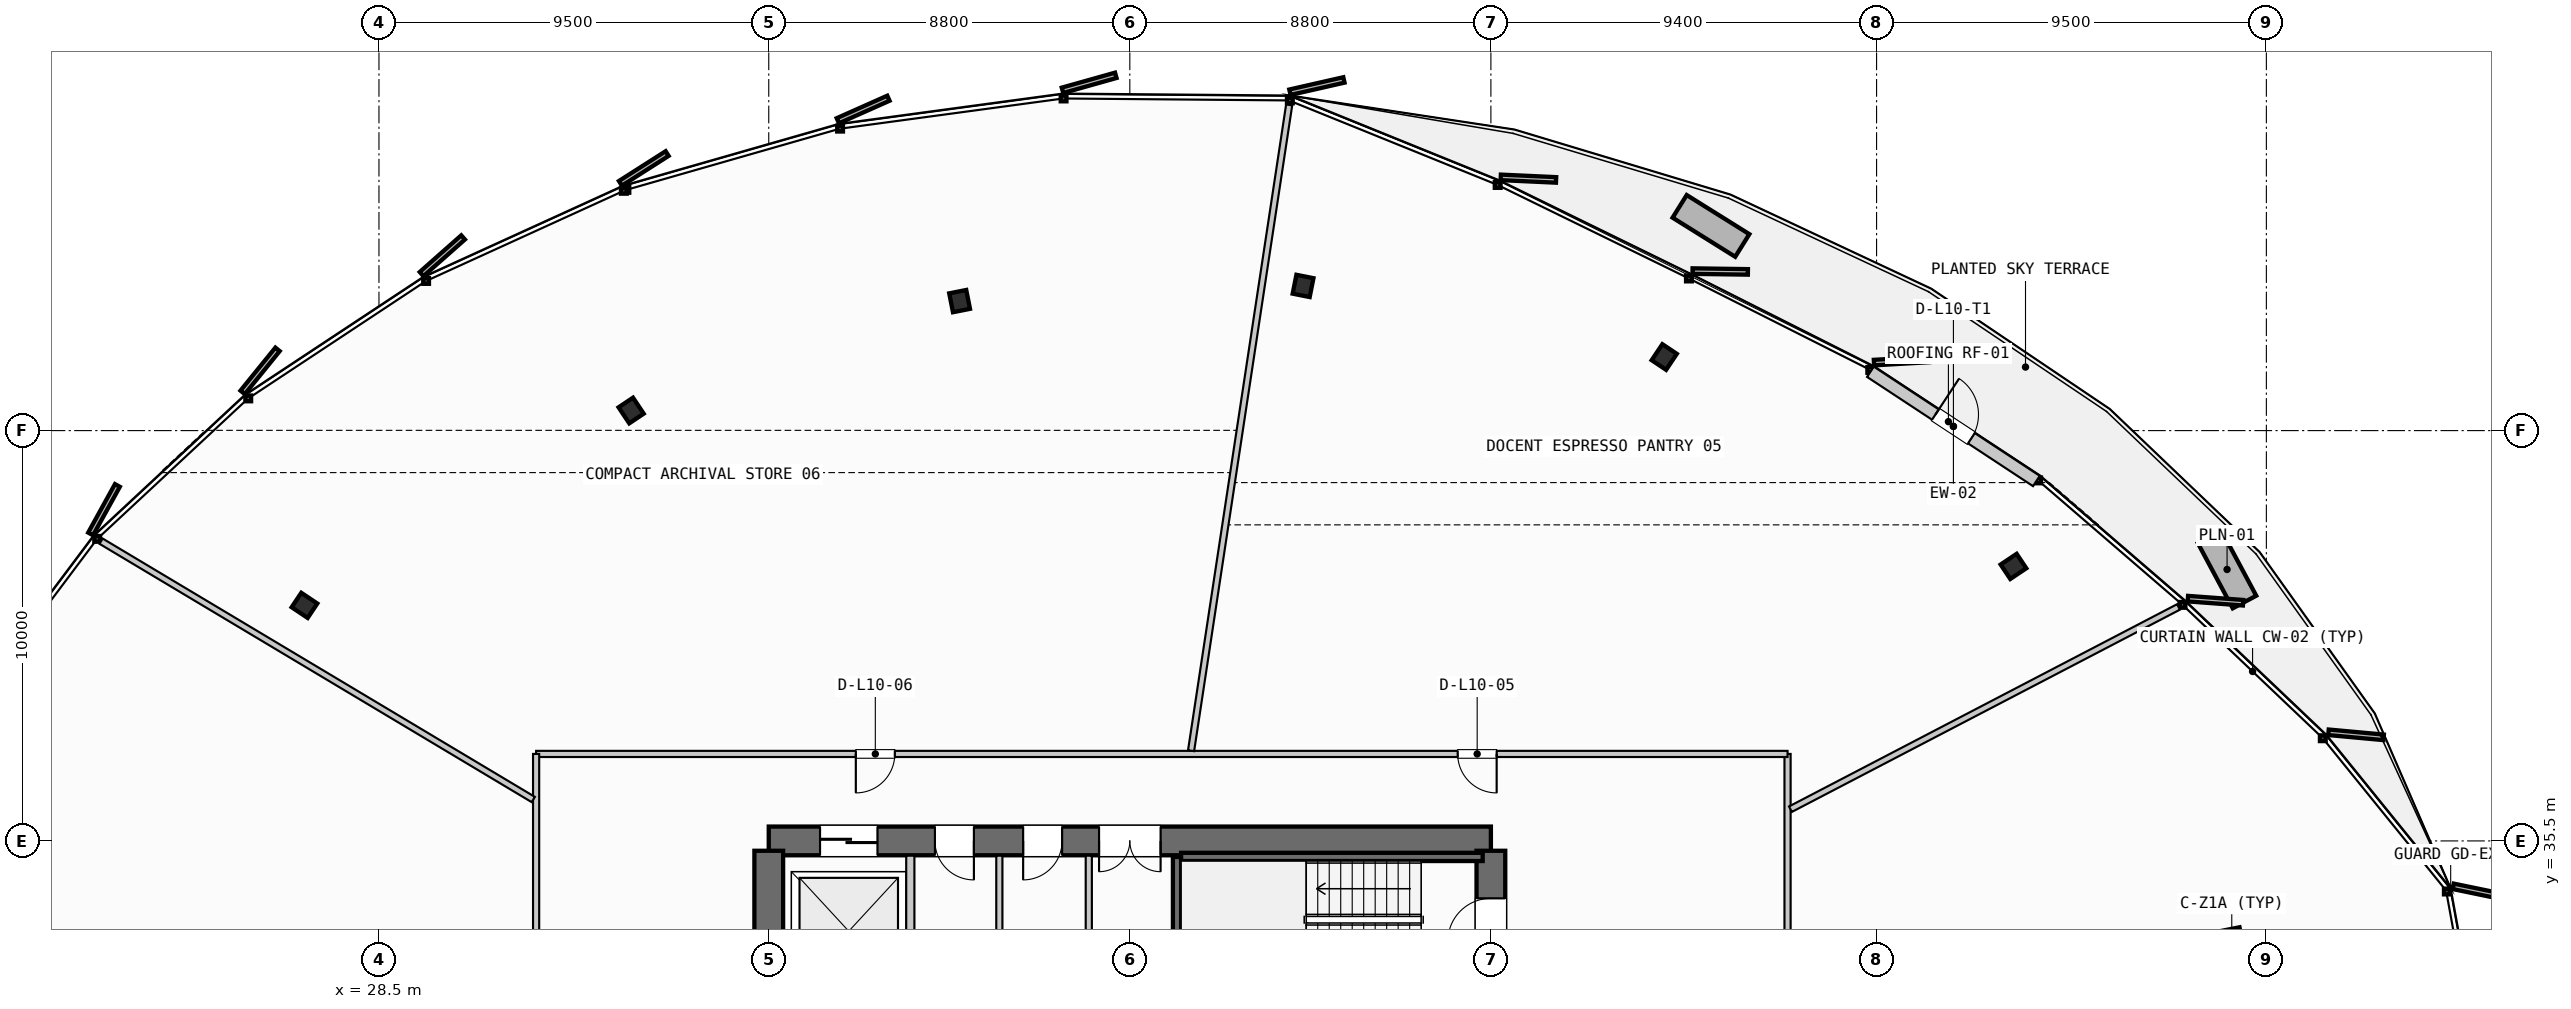
"""IFC4 building model, lengths in metres.
Left out: names, types, materials, properties, quantities, classifications, styles, units other than length and angle.
Written with IfcOpenShell. Run it as: python <this file> out.ifc"""

import sys

from ifc_helpers import new_model, si_unit, direction, frame, frame_2d, origin, origin_2d, place, context, subcontext, project, spatial, rectangle, i_section, extrude, source, transform, mapped, element, fill, save


model = new_model("IFC4")
c1 = context("Model", 3, precision=1e-05, world=origin(), true_north=direction((0.0, 1.0)))
c2 = subcontext(c1, "Body", "Model", "MODEL_VIEW")
j1 = project(units=[si_unit("LENGTHUNIT", "METRE"), si_unit("PLANEANGLEUNIT", "RADIAN")], contexts=[c1])
p1 = place(None, origin())
s1 = spatial("IfcSite", under=j1, at=p1, CompositionType="ELEMENT")
p2 = place(p1, origin())
s2 = spatial("IfcBuilding", under=s1, at=p2, CompositionType="ELEMENT")
p3 = place(p2, frame((0.0, 0.0, 44.8)))
s3 = spatial("IfcBuildingStorey", under=s2, at=p3, CompositionType="ELEMENT", Elevation=44.8)
p4 = place(p3, frame((55.6, 35.5, 0.0), z_axis=(0.0, 0.0, 1.0), x_axis=(-1.0, 0.0, 0.0)))
e1 = element("IfcWall", 1, at=p4, inside=s3, PredefinedType="SHEAR", context=c2, shape_type="SweptSolid", body=[
    extrude(rectangle(XDim=17.6, YDim=0.7, at=frame_2d((8.8, 0.0))), origin(), (0.0, 0.0, 1.0), 3.55),
])
p5 = place(p4, frame((8.05, 0.0, 0.0)))
e2 = element("IfcOpeningElement", 2, at=p5, cuts=e1, PredefinedType="OPENING", context=c2, shape_type="SweptSolid", body=[
    extrude(rectangle(XDim=1.5, YDim=2.2, at=frame_2d((0.75, 1.1))), frame((0.0, 0.36, 0.0), z_axis=(0.0, -1.0, 0.0), x_axis=(1.0, 0.0, 0.0)), (0.0, 0.0, 1.0), 0.72),
])
p6 = place(p4, frame((14.95, 0.0, 0.0)))
e3 = element("IfcOpeningElement", 3, at=p6, cuts=e1, PredefinedType="OPENING", context=c2, shape_type="SweptSolid", body=[
    extrude(rectangle(XDim=1.4, YDim=2.3, at=frame_2d((0.7, 1.15))), frame((0.0, 0.36, 0.0), z_axis=(0.0, -1.0, 0.0), x_axis=(1.0, 0.0, 0.0)), (0.0, 0.0, 1.0), 0.72),
])
p7 = place(p4, frame((12.6, 0.0, 0.0)))
e4 = element("IfcOpeningElement", 4, at=p7, cuts=e1, PredefinedType="OPENING", context=c2, shape_type="SweptSolid", body=[
    extrude(rectangle(XDim=0.95, YDim=2.15, at=frame_2d((0.475, 1.075))), frame((0.0, 0.36, 0.0), z_axis=(0.0, -1.0, 0.0), x_axis=(1.0, 0.0, 0.0)), (0.0, 0.0, 1.0), 0.72),
])
p8 = place(p4, frame((10.45, 0.0, 0.0)))
e5 = element("IfcOpeningElement", 5, at=p8, cuts=e1, PredefinedType="OPENING", context=c2, shape_type="SweptSolid", body=[
    extrude(rectangle(XDim=0.95, YDim=2.15, at=frame_2d((0.475, 1.075))), frame((0.0, 0.36, 0.0), z_axis=(0.0, -1.0, 0.0), x_axis=(1.0, 0.0, 0.0)), (0.0, 0.0, 1.0), 0.72),
])
p9 = place(p3, frame((38.0, 35.26, 0.0), z_axis=(0.0, 0.0, 1.0), x_axis=(0.0, -1.0, 0.0)))
e6 = element("IfcWall", 6, at=p9, inside=s3, PredefinedType="SHEAR", context=c2, shape_type="SweptSolid", body=[
    extrude(rectangle(XDim=14.92, YDim=0.7, at=frame_2d((7.46, 0.0))), origin(), (0.0, 0.0, 1.0), 3.55),
])
p10 = place(p9, frame((5.21, 0.0, 0.0)))
e7 = element("IfcOpeningElement", 7, at=p10, cuts=e6, PredefinedType="OPENING", context=c2, shape_type="SweptSolid", body=[
    extrude(rectangle(XDim=1.1, YDim=2.2, at=frame_2d((0.55, 1.1))), frame((0.0, 0.36, 0.0), z_axis=(0.0, -1.0, 0.0), x_axis=(1.0, 0.0, 0.0)), (0.0, 0.0, 1.0), 0.72),
])
p11 = place(p3, frame((55.6, 20.34, 0.0), z_axis=(0.0, 0.0, 1.0), x_axis=(0.0, 1.0, 0.0)))
e8 = element("IfcWall", 8, at=p11, inside=s3, PredefinedType="SHEAR", context=c2, shape_type="SweptSolid", body=[
    extrude(rectangle(XDim=14.92, YDim=0.7, at=frame_2d((7.46, 0.0))), origin(), (0.0, 0.0, 1.0), 3.55),
])
p12 = place(p11, frame((12.71, 0.0, 0.0)))
e9 = element("IfcOpeningElement", 9, at=p12, cuts=e8, PredefinedType="OPENING", context=c2, shape_type="SweptSolid", body=[
    extrude(rectangle(XDim=1.05, YDim=2.15, at=frame_2d((0.525, 1.075))), frame((0.0, 0.36, 0.0), z_axis=(0.0, -1.0, 0.0), x_axis=(1.0, 0.0, 0.0)), (0.0, 0.0, 1.0), 0.72),
])
p13 = place(p11, frame((8.61, 0.0, 0.0)))
e10 = element("IfcOpeningElement", 10, at=p13, cuts=e8, PredefinedType="OPENING", context=c2, shape_type="SweptSolid", body=[
    extrude(rectangle(XDim=1.1, YDim=2.2, at=frame_2d((0.55, 1.1))), frame((0.0, 0.36, 0.0), z_axis=(0.0, -1.0, 0.0), x_axis=(1.0, 0.0, 0.0)), (0.0, 0.0, 1.0), 0.72),
])
m1 = source(origin(), c2, "Body", "SweptSolid", [
    extrude(i_section(OverallWidth=0.423, OverallDepth=0.469, WebThickness=0.051, FlangeThickness=0.081, FilletRadius=0.015, at=origin_2d()), origin(), (0.0, 0.0, 1.0), 3.55),
])
for number, where, z_axis, x_axis in (
    (11, (73.657, 33.142, 0.0), (0.0, 0.0, 1.0), (0.981, 0.195, 0.0)),
    (12, (68.336, 42.19, 0.0), (0.0, 0.0, 1.0), (0.831, 0.556, 0.0)),
    (13, (59.825, 47.293, 0.0), (0.0, 0.0, 1.0), (0.556, 0.831, 0.0)),
    (14, (51.022, 49.026, 0.0), (0.0, 0.0, 1.0), (0.195, 0.981, 0.0)),
    (15, (42.652, 48.656, 0.0), (0.0, 0.0, 1.0), (-0.195, 0.981, 0.0)),
    (16, (34.646, 45.99, 0.0), (0.0, 0.0, 1.0), (-0.556, 0.831, 0.0)),
    (17, (26.685, 41.241, 0.0), (0.0, 0.0, 1.0), (-0.831, 0.556, 0.0)),
):
    element("IfcColumn", number, at=place(p3, frame(where, z_axis=z_axis, x_axis=x_axis)), inside=s3, PredefinedType="COLUMN", context=c2, shape_type="MappedRepresentation", body=[
        mapped(m1, transform((0.0, 0.0, 0.0), scale=1.0)),
    ])
p14 = place(p3, frame((64.85, 46.933, 0.0), z_axis=(0.0, 0.0, 1.0), x_axis=(0.835309232046, -0.549780398758, 0.0)))
e18 = element("IfcWall", 18, at=p14, inside=s3, PredefinedType="SOLIDWALL", context=c2, shape_type="SweptSolid", body=[
    extrude(rectangle(XDim=4.842, YDim=0.3, at=frame_2d((2.421, 0.0))), origin(), (0.0, 0.0, 1.0), 2.925),
])
p15 = place(p14, frame((1.896, 0.0, 0.0)))
e19 = element("IfcOpeningElement", 19, at=p15, cuts=e18, PredefinedType="OPENING", context=c2, shape_type="SweptSolid", body=[
    extrude(rectangle(XDim=1.05, YDim=2.2, at=frame_2d((0.525, 1.1))), frame((0.0, 0.16, 0.0), z_axis=(0.0, -1.0, 0.0), x_axis=(1.0, 0.0, 0.0)), (0.0, 0.0, 1.0), 0.32),
])
p16 = place(p3, frame((47.95, 32.05, 0.0), z_axis=(0.0, 0.0, 1.0), x_axis=(0.0, 1.0, 0.0)))
e20 = element("IfcWall", 20, at=p16, inside=s3, PredefinedType="SHEAR", context=c2, shape_type="SweptSolid", body=[
    extrude(rectangle(XDim=3.06, YDim=0.2, at=frame_2d((1.53, 0.0))), origin(), (0.0, 0.0, 1.0), 3.55),
])
p17 = place(p3, frame((48.05, 35.11, 0.0), z_axis=(0.0, 0.0, 1.0), x_axis=(1.0, 0.0, 0.0)))
e21 = element("IfcWall", 21, at=p17, inside=s3, PredefinedType="SHEAR", context=c2, shape_type="SweptSolid", body=[
    extrude(rectangle(XDim=7.35, YDim=0.2, at=frame_2d((3.675, 0.0))), origin(), (0.0, 0.0, 1.0), 3.55),
])
p18 = place(p3, frame((41.45, 31.85, 0.0), z_axis=(0.0, 0.0, 1.0), x_axis=(0.0, 1.0, 0.0)))
e22 = element("IfcWall", 22, at=p18, inside=s3, PredefinedType="PARTITIONING", context=c2, shape_type="SweptSolid", body=[
    extrude(rectangle(XDim=3.29, YDim=0.2, at=frame_2d((1.645, 0.0))), origin(), (0.0, 0.0, 1.0), 2.785),
])
p19 = place(p3, frame((45.8, 31.85, 0.0), z_axis=(0.0, 0.0, 1.0), x_axis=(0.0, 1.0, 0.0)))
e23 = element("IfcWall", 23, at=p19, inside=s3, PredefinedType="PARTITIONING", context=c2, shape_type="SweptSolid", body=[
    extrude(rectangle(XDim=3.29, YDim=0.15, at=frame_2d((1.645, 0.0))), origin(), (0.0, 0.0, 1.0), 2.785),
])
p20 = place(p3, frame((43.62, 31.85, 0.0), z_axis=(0.0, 0.0, 1.0), x_axis=(0.0, 1.0, 0.0)))
e24 = element("IfcWall", 24, at=p20, inside=s3, PredefinedType="PLUMBINGWALL", context=c2, shape_type="SweptSolid", body=[
    extrude(rectangle(XDim=3.29, YDim=0.15, at=frame_2d((1.645, 0.0))), origin(), (0.0, 0.0, 1.0), 2.785),
])
p21 = place(p3, frame((62.83, 17.14, 0.0), z_axis=(0.0, 0.0, 1.0), x_axis=(0.0, 1.0, 0.0)))
e25 = element("IfcWall", 25, at=p21, inside=s3, PredefinedType="PARTITIONING", context=c2, shape_type="SweptSolid", body=[
    extrude(rectangle(XDim=20.48, YDim=0.15, at=frame_2d((10.24, 0.0))), origin(), (0.0, 0.0, 1.0), 2.785),
])
p22 = place(p21, frame((2.438, 0.0, 0.0)))
e26 = element("IfcOpeningElement", 26, at=p22, cuts=e25, PredefinedType="OPENING", context=c2, shape_type="SweptSolid", body=[
    extrude(rectangle(XDim=0.95, YDim=2.15, at=frame_2d((0.475, 1.075))), frame((0.0, 0.085, 0.0), z_axis=(0.0, -1.0, 0.0), x_axis=(1.0, 0.0, 0.0)), (0.0, 0.0, 1.0), 0.17),
])
p23 = place(p21, frame((11.341, 0.0, 0.0)))
e27 = element("IfcOpeningElement", 27, at=p23, cuts=e25, PredefinedType="OPENING", context=c2, shape_type="SweptSolid", body=[
    extrude(rectangle(XDim=0.95, YDim=2.15, at=frame_2d((0.475, 1.075))), frame((0.0, 0.085, 0.0), z_axis=(0.0, -1.0, 0.0), x_axis=(1.0, 0.0, 0.0)), (0.0, 0.0, 1.0), 0.17),
])
p24 = place(p3, frame((62.83, 37.62, 0.0), z_axis=(0.0, 0.0, 1.0), x_axis=(-1.0, 0.0, 0.0)))
e28 = element("IfcWall", 28, at=p24, inside=s3, PredefinedType="PARTITIONING", context=c2, shape_type="SweptSolid", body=[
    extrude(rectangle(XDim=30.5, YDim=0.15, at=frame_2d((15.25, 0.0))), origin(), (0.0, 0.0, 1.0), 2.785),
])
p25 = place(p24, frame((7.089, 0.0, 0.0)))
e29 = element("IfcOpeningElement", 29, at=p25, cuts=e28, PredefinedType="OPENING", context=c2, shape_type="SweptSolid", body=[
    extrude(rectangle(XDim=0.95, YDim=2.15, at=frame_2d((0.475, 1.075))), frame((0.0, 0.085, 0.0), z_axis=(0.0, -1.0, 0.0), x_axis=(1.0, 0.0, 0.0)), (0.0, 0.0, 1.0), 0.17),
])
p26 = place(p24, frame((21.758, 0.0, 0.0)))
e30 = element("IfcOpeningElement", 30, at=p26, cuts=e28, PredefinedType="OPENING", context=c2, shape_type="SweptSolid", body=[
    extrude(rectangle(XDim=0.95, YDim=2.15, at=frame_2d((0.475, 1.075))), frame((0.0, 0.085, 0.0), z_axis=(0.0, -1.0, 0.0), x_axis=(1.0, 0.0, 0.0)), (0.0, 0.0, 1.0), 0.17),
])
p27 = place(p3, frame((32.33, 37.62, 0.0), z_axis=(0.0, 0.0, 1.0), x_axis=(0.0, -1.0, 0.0)))
e31 = element("IfcWall", 31, at=p27, inside=s3, PredefinedType="PARTITIONING", context=c2, shape_type="SweptSolid", body=[
    extrude(rectangle(XDim=20.48, YDim=0.15, at=frame_2d((10.24, 0.0))), origin(), (0.0, 0.0, 1.0), 2.785),
])
p28 = place(p27, frame((10.028, 0.0, 0.0)))
e32 = element("IfcOpeningElement", 32, at=p28, cuts=e31, PredefinedType="OPENING", context=c2, shape_type="SweptSolid", body=[
    extrude(rectangle(XDim=0.95, YDim=2.15, at=frame_2d((0.475, 1.075))), frame((0.0, 0.085, 0.0), z_axis=(0.0, -1.0, 0.0), x_axis=(1.0, 0.0, 0.0)), (0.0, 0.0, 1.0), 0.17),
])
p29 = place(p3, frame((62.901, 36.273, 0.0), z_axis=(0.0, 0.0, 1.0), x_axis=(0.886802298862, 0.462148983266, 0.0)))
e33 = element("IfcWall", 33, at=p29, inside=s3, PredefinedType="PARTITIONING", context=c2, shape_type="SweptSolid", body=[
    extrude(rectangle(XDim=10.665, YDim=0.15, at=frame_2d((5.333, 0.0))), origin(), (0.0, 0.0, 1.0), 2.785),
])
p30 = place(p3, frame((48.293, 37.699, 0.0), z_axis=(0.0, 0.0, 1.0), x_axis=(0.150173813807, 0.988659610608, 0.0)))
e34 = element("IfcWall", 34, at=p30, inside=s3, PredefinedType="PARTITIONING", context=c2, shape_type="SweptSolid", body=[
    extrude(rectangle(XDim=15.919, YDim=0.15, at=frame_2d((7.959, 0.0))), origin(), (0.0, 0.0, 1.0), 2.785),
])
p31 = place(p3, frame((32.261, 36.509, 0.0), z_axis=(0.0, 0.0, 1.0), x_axis=(-0.858371109645, 0.513029276092, 0.0)))
e35 = element("IfcWall", 35, at=p31, inside=s3, PredefinedType="PARTITIONING", context=c2, shape_type="SweptSolid", body=[
    extrude(rectangle(XDim=12.272, YDim=0.15, at=frame_2d((6.136, 0.0))), origin(), (0.0, 0.0, 1.0), 2.785),
])
m2 = source(origin(), c2, "Body", "SweptSolid", [
    extrude(rectangle(XDim=1.05, YDim=2.2, at=frame_2d((0.525, 1.1))), frame((0.0, 0.025, 0.0), z_axis=(0.0, -1.0, 0.0), x_axis=(1.0, 0.0, 0.0)), (0.0, 0.0, 1.0), 0.05),
])
p32 = place(p15, origin())
e36 = element("IfcDoor", 36, at=p32, inside=s3, OperationType="SINGLE_SWING_LEFT", PredefinedType="DOOR", context=c2, shape_type="MappedRepresentation", body=[
    mapped(m2, transform((0.0, 0.0, 0.0), scale=1.0)),
])
fill(e19, e36)
m3 = source(origin(), c2, "Body", "SweptSolid", [
    extrude(rectangle(XDim=1.05, YDim=2.15, at=frame_2d((0.525, 1.075))), frame((0.0, 0.025, 0.0), z_axis=(0.0, -1.0, 0.0), x_axis=(1.0, 0.0, 0.0)), (0.0, 0.0, 1.0), 0.05),
])
p33 = place(p12, origin())
e37 = element("IfcDoor", 37, at=p33, inside=s3, OperationType="SINGLE_SWING_LEFT", PredefinedType="DOOR", context=c2, shape_type="MappedRepresentation", body=[
    mapped(m3, transform((0.0, 0.0, 0.0), scale=1.0)),
])
fill(e9, e37)
m4 = source(origin(), c2, "Body", "SweptSolid", [
    extrude(rectangle(XDim=1.5, YDim=2.2, at=frame_2d((0.75, 1.1))), frame((0.0, 0.025, 0.0), z_axis=(0.0, -1.0, 0.0), x_axis=(1.0, 0.0, 0.0)), (0.0, 0.0, 1.0), 0.05),
])
p34 = place(p5, origin())
e38 = element("IfcDoor", 38, at=p34, inside=s3, OperationType="DOUBLE_DOOR_SINGLE_SWING", PredefinedType="DOOR", context=c2, shape_type="MappedRepresentation", body=[
    mapped(m4, transform((0.0, 0.0, 0.0), scale=1.0)),
])
fill(e2, e38)
m5 = source(origin(), c2, "Body", "SweptSolid", [
    extrude(rectangle(XDim=1.4, YDim=2.3, at=frame_2d((0.7, 1.15))), frame((0.0, 0.025, 0.0), z_axis=(0.0, -1.0, 0.0), x_axis=(1.0, 0.0, 0.0)), (0.0, 0.0, 1.0), 0.05),
])
p35 = place(p6, origin())
e39 = element("IfcDoor", 39, at=p35, inside=s3, OperationType="SLIDING_TO_RIGHT", PredefinedType="DOOR", context=c2, shape_type="MappedRepresentation", body=[
    mapped(m5, transform((0.0, 0.0, 0.0), scale=1.0)),
])
fill(e3, e39)
m6 = source(origin(), c2, "Body", "SweptSolid", [
    extrude(rectangle(XDim=0.95, YDim=2.15, at=frame_2d((0.475, 1.075))), frame((0.0, 0.025, 0.0), z_axis=(0.0, -1.0, 0.0), x_axis=(1.0, 0.0, 0.0)), (0.0, 0.0, 1.0), 0.05),
])
p36 = place(p7, origin())
e40 = element("IfcDoor", 40, at=p36, inside=s3, OperationType="SINGLE_SWING_LEFT", PredefinedType="DOOR", context=c2, shape_type="MappedRepresentation", body=[
    mapped(m6, transform((0.0, 0.0, 0.0), scale=1.0)),
])
fill(e4, e40)
p37 = place(p8, origin())
e41 = element("IfcDoor", 41, at=p37, inside=s3, OperationType="SINGLE_SWING_RIGHT", PredefinedType="DOOR", context=c2, shape_type="MappedRepresentation", body=[
    mapped(m6, transform((0.0, 0.0, 0.0), scale=1.0)),
])
fill(e5, e41)
p38 = place(p25, origin())
e42 = element("IfcDoor", 42, at=p38, inside=s3, OperationType="SINGLE_SWING_LEFT", PredefinedType="DOOR", context=c2, shape_type="MappedRepresentation", body=[
    mapped(m6, transform((0.0, 0.0, 0.0), scale=1.0)),
])
fill(e29, e42)
p39 = place(p26, origin())
e43 = element("IfcDoor", 43, at=p39, inside=s3, OperationType="SINGLE_SWING_RIGHT", PredefinedType="DOOR", context=c2, shape_type="MappedRepresentation", body=[
    mapped(m6, transform((0.0, 0.0, 0.0), scale=1.0)),
])
fill(e30, e43)
save(model, sys.argv[1])
